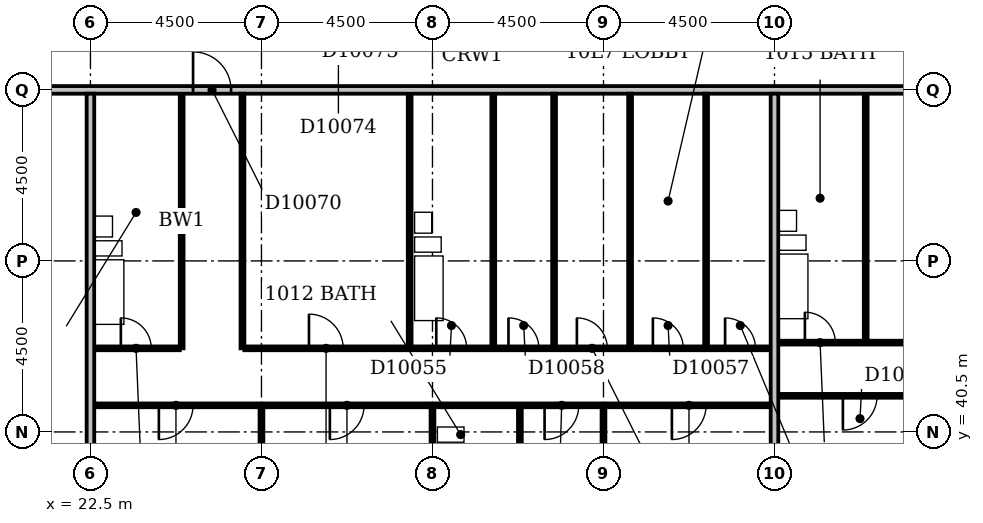
"""IFC4 building model, lengths in metres.
Left out: names, types, materials, properties, quantities, classifications, styles, units other than length and angle.
Written with IfcOpenShell. Run it as: python <this file> out.ifc"""

import sys

from ifc_helpers import new_model, si_unit, direction, frame, frame_2d, origin, place, context, subcontext, project, spatial, rectangle, extrude, element, fill, save


model = new_model("IFC4")
c1 = context("Model", 3, precision=1e-05, world=origin(), true_north=direction((0.0, 1.0)))
c2 = subcontext(c1, "Body", "Model", "MODEL_VIEW")
j1 = project(units=[si_unit("LENGTHUNIT", "METRE"), si_unit("PLANEANGLEUNIT", "RADIAN")], contexts=[c1])
p1 = place(None, origin())
s1 = spatial("IfcSite", under=j1, at=p1, CompositionType="ELEMENT")
p2 = place(p1, origin())
s2 = spatial("IfcBuilding", under=s1, at=p2, CompositionType="ELEMENT")
p3 = place(p2, frame((0.0, 0.0, 47.0)))
s3 = spatial("IfcBuildingStorey", under=s2, at=p3, CompositionType="ELEMENT", Elevation=47.0)
p4 = place(p3, frame((22.5, 36.6, 0.0), z_axis=(0.0, 0.0, 1.0), x_axis=(0.0, 1.0, 0.0)))
e1 = element("IfcWall", 1, at=p4, inside=s3, PredefinedType="PARTITIONING", context=c2, shape_type="SweptSolid", body=[
    extrude(rectangle(XDim=12.8, YDim=0.2, at=frame_2d((6.4, 0.0))), origin(), (0.0, 0.0, 1.0), 3.3),
])
p5 = place(p3, frame((27.0, 36.6, 0.0), z_axis=(0.0, 0.0, 1.0), x_axis=(0.0, 1.0, 0.0)))
e2 = element("IfcWall", 2, at=p5, inside=s3, PredefinedType="PARTITIONING", context=c2, shape_type="SweptSolid", body=[
    extrude(rectangle(XDim=4.55, YDim=0.1, at=frame_2d((2.275, 0.0))), origin(), (0.0, 0.0, 1.0), 2.6),
])
p6 = place(p3, frame((31.5, 36.6, 0.0), z_axis=(0.0, 0.0, 1.0), x_axis=(0.0, 1.0, 0.0)))
e3 = element("IfcWall", 3, at=p6, inside=s3, PredefinedType="PARTITIONING", context=c2, shape_type="SweptSolid", body=[
    extrude(rectangle(XDim=4.55, YDim=0.1, at=frame_2d((2.275, 0.0))), origin(), (0.0, 0.0, 1.0), 3.3),
])
p7 = place(p3, frame((36.0, 36.6, 0.0), z_axis=(0.0, 0.0, 1.0), x_axis=(0.0, 1.0, 0.0)))
e4 = element("IfcWall", 4, at=p7, inside=s3, PredefinedType="PARTITIONING", context=c2, shape_type="SweptSolid", body=[
    extrude(rectangle(XDim=4.55, YDim=0.1, at=frame_2d((2.275, 0.0))), origin(), (0.0, 0.0, 1.0), 2.4),
])
p8 = place(p3, frame((40.5, 36.6, 0.0), z_axis=(0.0, 0.0, 1.0), x_axis=(0.0, 1.0, 0.0)))
e5 = element("IfcWall", 5, at=p8, inside=s3, PredefinedType="PARTITIONING", context=c2, shape_type="SweptSolid", body=[
    extrude(rectangle(XDim=12.8, YDim=0.2, at=frame_2d((6.4, 0.0))), origin(), (0.0, 0.0, 1.0), 3.3),
])
p9 = place(p3, frame((33.8, 38.3, 0.0), z_axis=(0.0, 0.0, 1.0), x_axis=(0.0, 1.0, 0.0)))
e6 = element("IfcWall", 6, at=p9, inside=s3, PredefinedType="PLUMBINGWALL", context=c2, shape_type="SweptSolid", body=[
    extrude(rectangle(XDim=2.85, YDim=0.1, at=frame_2d((1.425, 0.0))), origin(), (0.0, 0.0, 1.0), 3.3),
])
p10 = place(p9, frame((1.05, 0.0, 0.0)))
e7 = element("IfcOpeningElement", 7, at=p10, cuts=e6, PredefinedType="OPENING", context=c2, shape_type="SweptSolid", body=[
    extrude(rectangle(XDim=0.8, YDim=2.1, at=frame_2d((0.4, 1.05))), frame((0.0, 0.062, 0.0), z_axis=(0.0, -1.0, 0.0), x_axis=(1.0, 0.0, 0.0)), (0.0, 0.0, 1.0), 0.124),
])
p11 = place(p3, frame((22.6, 41.2, 0.0), z_axis=(0.0, 0.0, 1.0), x_axis=(1.0, 0.0, 0.0)))
e8 = element("IfcWall", 8, at=p11, inside=s3, PredefinedType="PARTITIONING", context=c2, shape_type="SweptSolid", body=[
    extrude(rectangle(XDim=17.8, YDim=0.1, at=frame_2d((8.9, 0.0))), origin(), (0.0, 0.0, 1.0), 3.3),
])
p12 = place(p11, frame((1.7, 0.0, 0.0)))
e9 = element("IfcOpeningElement", 9, at=p12, cuts=e8, PredefinedType="OPENING", context=c2, shape_type="SweptSolid", body=[
    extrude(rectangle(XDim=0.9, YDim=2.1, at=frame_2d((0.45, 1.05))), frame((0.0, 0.062, 0.0), z_axis=(0.0, -1.0, 0.0), x_axis=(1.0, 0.0, 0.0)), (0.0, 0.0, 1.0), 0.124),
])
p13 = place(p11, frame((6.2, 0.0, 0.0)))
e10 = element("IfcOpeningElement", 10, at=p13, cuts=e8, PredefinedType="OPENING", context=c2, shape_type="SweptSolid", body=[
    extrude(rectangle(XDim=0.9, YDim=2.1, at=frame_2d((0.45, 1.05))), frame((0.0, 0.062, 0.0), z_axis=(0.0, -1.0, 0.0), x_axis=(1.0, 0.0, 0.0)), (0.0, 0.0, 1.0), 0.124),
])
p14 = place(p11, frame((11.85, 0.0, 0.0)))
e11 = element("IfcOpeningElement", 11, at=p14, cuts=e8, PredefinedType="OPENING", context=c2, shape_type="SweptSolid", body=[
    extrude(rectangle(XDim=0.9, YDim=2.1, at=frame_2d((0.45, 1.05))), frame((0.0, 0.062, 0.0), z_axis=(0.0, -1.0, 0.0), x_axis=(1.0, 0.0, 0.0)), (0.0, 0.0, 1.0), 0.124),
])
p15 = place(p11, frame((15.2, 0.0, 0.0)))
e12 = element("IfcOpeningElement", 12, at=p15, cuts=e8, PredefinedType="OPENING", context=c2, shape_type="SweptSolid", body=[
    extrude(rectangle(XDim=0.9, YDim=2.1, at=frame_2d((0.45, 1.05))), frame((0.0, 0.062, 0.0), z_axis=(0.0, -1.0, 0.0), x_axis=(1.0, 0.0, 0.0)), (0.0, 0.0, 1.0), 0.124),
])
p16 = place(p3, frame((40.6, 41.45, 0.0), z_axis=(0.0, 0.0, 1.0), x_axis=(1.0, 0.0, 0.0)))
e13 = element("IfcWall", 13, at=p16, inside=s3, PredefinedType="PARTITIONING", context=c2, shape_type="SweptSolid", body=[
    extrude(rectangle(XDim=13.3, YDim=0.1, at=frame_2d((6.65, 0.0))), origin(), (0.0, 0.0, 1.0), 3.3),
])
p17 = place(p16, frame((1.7, 0.0, 0.0)))
e14 = element("IfcOpeningElement", 14, at=p17, cuts=e13, PredefinedType="OPENING", context=c2, shape_type="SweptSolid", body=[
    extrude(rectangle(XDim=0.9, YDim=2.1, at=frame_2d((0.45, 1.05))), frame((0.0, 0.062, 0.0), z_axis=(0.0, -1.0, 0.0), x_axis=(1.0, 0.0, 0.0)), (0.0, 0.0, 1.0), 0.124),
])
p18 = place(p16, frame((6.2, 0.0, 0.0)))
e15 = element("IfcOpeningElement", 15, at=p18, cuts=e13, PredefinedType="OPENING", context=c2, shape_type="SweptSolid", body=[
    extrude(rectangle(XDim=0.9, YDim=2.1, at=frame_2d((0.45, 1.05))), frame((0.0, 0.062, 0.0), z_axis=(0.0, -1.0, 0.0), x_axis=(1.0, 0.0, 0.0)), (0.0, 0.0, 1.0), 0.124),
])
p19 = place(p16, frame((10.7, 0.0, 0.0)))
e16 = element("IfcOpeningElement", 16, at=p19, cuts=e13, PredefinedType="OPENING", context=c2, shape_type="SweptSolid", body=[
    extrude(rectangle(XDim=0.9, YDim=2.1, at=frame_2d((0.45, 1.05))), frame((0.0, 0.062, 0.0), z_axis=(0.0, -1.0, 0.0), x_axis=(1.0, 0.0, 0.0)), (0.0, 0.0, 1.0), 0.124),
])
p20 = place(p3, frame((22.6, 42.7, 0.0), z_axis=(0.0, 0.0, 1.0), x_axis=(1.0, 0.0, 0.0)))
e17 = element("IfcWall", 17, at=p20, inside=s3, PredefinedType="PARTITIONING", context=c2, shape_type="SweptSolid", body=[
    extrude(rectangle(XDim=2.25, YDim=0.1, at=frame_2d((1.125, 0.0))), origin(), (0.0, 0.0, 1.0), 3.3),
])
p21 = place(p20, frame((0.7, 0.0, 0.0)))
e18 = element("IfcOpeningElement", 18, at=p21, cuts=e17, PredefinedType="OPENING", context=c2, shape_type="SweptSolid", body=[
    extrude(rectangle(XDim=0.8, YDim=2.1, at=frame_2d((0.4, 1.05))), frame((0.0, 0.062, 0.0), z_axis=(0.0, -1.0, 0.0), x_axis=(1.0, 0.0, 0.0)), (0.0, 0.0, 1.0), 0.124),
])
p22 = place(p3, frame((24.9, 42.7, 0.0), z_axis=(0.0, 0.0, 1.0), x_axis=(0.0, 1.0, 0.0)))
e19 = element("IfcWall", 19, at=p22, inside=s3, PredefinedType="PLUMBINGWALL", context=c2, shape_type="SweptSolid", body=[
    extrude(rectangle(XDim=6.7, YDim=0.1, at=frame_2d((3.35, 0.0))), origin(), (0.0, 0.0, 1.0), 3.3),
])
p23 = place(p3, frame((26.5, 42.7, 0.0), z_axis=(0.0, 0.0, 1.0), x_axis=(0.0, 1.0, 0.0)))
e20 = element("IfcWall", 20, at=p23, inside=s3, PredefinedType="PARTITIONING", context=c2, shape_type="SweptSolid", body=[
    extrude(rectangle(XDim=6.7, YDim=0.1, at=frame_2d((3.35, 0.0))), origin(), (0.0, 0.0, 1.0), 2.6),
])
p24 = place(p3, frame((26.55, 42.7, 0.0), z_axis=(0.0, 0.0, 1.0), x_axis=(1.0, 0.0, 0.0)))
e21 = element("IfcWall", 21, at=p24, inside=s3, PredefinedType="PARTITIONING", context=c2, shape_type="SweptSolid", body=[
    extrude(rectangle(XDim=13.85, YDim=0.1, at=frame_2d((6.925, 0.0))), origin(), (0.0, 0.0, 1.0), 3.3),
])
p25 = place(p24, frame((5.05, 0.0, 0.0)))
e22 = element("IfcOpeningElement", 22, at=p25, cuts=e21, PredefinedType="OPENING", context=c2, shape_type="SweptSolid", body=[
    extrude(rectangle(XDim=0.8, YDim=2.1, at=frame_2d((0.4, 1.05))), frame((0.0, 0.062, 0.0), z_axis=(0.0, -1.0, 0.0), x_axis=(1.0, 0.0, 0.0)), (0.0, 0.0, 1.0), 0.124),
])
p26 = place(p24, frame((1.7, 0.0, 0.0)))
e23 = element("IfcOpeningElement", 23, at=p26, cuts=e21, PredefinedType="OPENING", context=c2, shape_type="SweptSolid", body=[
    extrude(rectangle(XDim=0.9, YDim=2.1, at=frame_2d((0.45, 1.05))), frame((0.0, 0.062, 0.0), z_axis=(0.0, -1.0, 0.0), x_axis=(1.0, 0.0, 0.0)), (0.0, 0.0, 1.0), 0.124),
])
p27 = place(p24, frame((10.75, 0.0, 0.0)))
e24 = element("IfcOpeningElement", 24, at=p27, cuts=e21, PredefinedType="OPENING", context=c2, shape_type="SweptSolid", body=[
    extrude(rectangle(XDim=0.8, YDim=2.1, at=frame_2d((0.4, 1.05))), frame((0.0, 0.062, 0.0), z_axis=(0.0, -1.0, 0.0), x_axis=(1.0, 0.0, 0.0)), (0.0, 0.0, 1.0), 0.124),
])
p28 = place(p24, frame((6.95, 0.0, 0.0)))
e25 = element("IfcOpeningElement", 25, at=p28, cuts=e21, PredefinedType="OPENING", context=c2, shape_type="SweptSolid", body=[
    extrude(rectangle(XDim=0.8, YDim=2.1, at=frame_2d((0.4, 1.05))), frame((0.0, 0.062, 0.0), z_axis=(0.0, -1.0, 0.0), x_axis=(1.0, 0.0, 0.0)), (0.0, 0.0, 1.0), 0.124),
])
p29 = place(p24, frame((8.75, 0.0, 0.0)))
e26 = element("IfcOpeningElement", 26, at=p29, cuts=e21, PredefinedType="OPENING", context=c2, shape_type="SweptSolid", body=[
    extrude(rectangle(XDim=0.8, YDim=2.1, at=frame_2d((0.4, 1.05))), frame((0.0, 0.062, 0.0), z_axis=(0.0, -1.0, 0.0), x_axis=(1.0, 0.0, 0.0)), (0.0, 0.0, 1.0), 0.124),
])
p30 = place(p24, frame((12.65, 0.0, 0.0)))
e27 = element("IfcOpeningElement", 27, at=p30, cuts=e21, PredefinedType="OPENING", context=c2, shape_type="SweptSolid", body=[
    extrude(rectangle(XDim=0.8, YDim=2.1, at=frame_2d((0.4, 1.05))), frame((0.0, 0.062, 0.0), z_axis=(0.0, -1.0, 0.0), x_axis=(1.0, 0.0, 0.0)), (0.0, 0.0, 1.0), 0.124),
])
for number, where, z_axis, x_axis in (
    (28, (30.9, 42.75, 0.0), (0.0, 0.0, 1.0), (0.0, 1.0, 0.0)),
    (29, (33.1, 42.75, 0.0), (0.0, 0.0, 1.0), (0.0, 1.0, 0.0)),
):
    element("IfcWall", number, at=place(p3, frame(where, z_axis=z_axis, x_axis=x_axis)), inside=s3, PredefinedType="PLUMBINGWALL", context=c2, shape_type="SweptSolid", body=[
        extrude(rectangle(XDim=6.65, YDim=0.1, at=frame_2d((3.325, 0.0))), origin(), (0.0, 0.0, 1.0), 3.3),
    ])
p31 = place(p3, frame((34.7, 42.75, 0.0), z_axis=(0.0, 0.0, 1.0), x_axis=(0.0, 1.0, 0.0)))
e30 = element("IfcWall", 30, at=p31, inside=s3, PredefinedType="PARTITIONING", context=c2, shape_type="SweptSolid", body=[
    extrude(rectangle(XDim=6.65, YDim=0.1, at=frame_2d((3.325, 0.0))), origin(), (0.0, 0.0, 1.0), 3.3),
])
p32 = place(p3, frame((36.7, 42.75, 0.0), z_axis=(0.0, 0.0, 1.0), x_axis=(0.0, 1.0, 0.0)))
e31 = element("IfcWall", 31, at=p32, inside=s3, PredefinedType="PARTITIONING", context=c2, shape_type="SweptSolid", body=[
    extrude(rectangle(XDim=6.65, YDim=0.1, at=frame_2d((3.325, 0.0))), origin(), (0.0, 0.0, 1.0), 2.4),
])
p33 = place(p3, frame((38.7, 42.75, 0.0), z_axis=(0.0, 0.0, 1.0), x_axis=(0.0, 1.0, 0.0)))
e32 = element("IfcWall", 32, at=p33, inside=s3, PredefinedType="PARTITIONING", context=c2, shape_type="SweptSolid", body=[
    extrude(rectangle(XDim=6.65, YDim=0.1, at=frame_2d((3.325, 0.0))), origin(), (0.0, 0.0, 1.0), 3.3),
])
p34 = place(p3, frame((40.6, 42.85, 0.0), z_axis=(0.0, 0.0, 1.0), x_axis=(1.0, 0.0, 0.0)))
e33 = element("IfcWall", 33, at=p34, inside=s3, PredefinedType="PARTITIONING", context=c2, shape_type="SweptSolid", body=[
    extrude(rectangle(XDim=8.15, YDim=0.1, at=frame_2d((4.075, 0.0))), origin(), (0.0, 0.0, 1.0), 3.3),
])
p35 = place(p34, frame((0.7, 0.0, 0.0)))
e34 = element("IfcOpeningElement", 34, at=p35, cuts=e33, PredefinedType="OPENING", context=c2, shape_type="SweptSolid", body=[
    extrude(rectangle(XDim=0.8, YDim=2.1, at=frame_2d((0.4, 1.05))), frame((0.0, 0.062, 0.0), z_axis=(0.0, -1.0, 0.0), x_axis=(1.0, 0.0, 0.0)), (0.0, 0.0, 1.0), 0.124),
])
p36 = place(p34, frame((4.8, 0.0, 0.0)))
e35 = element("IfcOpeningElement", 35, at=p36, cuts=e33, PredefinedType="OPENING", context=c2, shape_type="SweptSolid", body=[
    extrude(rectangle(XDim=0.9, YDim=2.1, at=frame_2d((0.45, 1.05))), frame((0.0, 0.062, 0.0), z_axis=(0.0, -1.0, 0.0), x_axis=(1.0, 0.0, 0.0)), (0.0, 0.0, 1.0), 0.124),
])
p37 = place(p3, frame((42.9, 42.9, 0.0), z_axis=(0.0, 0.0, 1.0), x_axis=(0.0, 1.0, 0.0)))
e36 = element("IfcWall", 36, at=p37, inside=s3, PredefinedType="PLUMBINGWALL", context=c2, shape_type="SweptSolid", body=[
    extrude(rectangle(XDim=6.5, YDim=0.1, at=frame_2d((3.25, 0.0))), origin(), (0.0, 0.0, 1.0), 3.3),
])
p38 = place(p3, frame((9.1, 49.5, 0.0), z_axis=(0.0, 0.0, 1.0), x_axis=(1.0, 0.0, 0.0)))
e37 = element("IfcWall", 37, at=p38, inside=s3, PredefinedType="PARTITIONING", context=c2, shape_type="SweptSolid", body=[
    extrude(rectangle(XDim=57.8, YDim=0.2, at=frame_2d((28.9, 0.0))), origin(), (0.0, 0.0, 1.0), 3.3),
])
p39 = place(p38, frame((16.1, 0.0, 0.0)))
e38 = element("IfcOpeningElement", 38, at=p39, cuts=e37, PredefinedType="OPENING", context=c2, shape_type="SweptSolid", body=[
    extrude(rectangle(XDim=1.0, YDim=2.1, at=frame_2d((0.5, 1.05))), frame((0.0, 0.112, 0.0), z_axis=(0.0, -1.0, 0.0), x_axis=(1.0, 0.0, 0.0)), (0.0, 0.0, 1.0), 0.224),
])
p40 = place(p38, frame((40.0, 0.0, 0.0)))
e39 = element("IfcOpeningElement", 39, at=p40, cuts=e37, PredefinedType="OPENING", context=c2, shape_type="SweptSolid", body=[
    extrude(rectangle(XDim=1.0, YDim=2.1, at=frame_2d((0.5, 1.05))), frame((0.0, 0.112, 0.0), z_axis=(0.0, -1.0, 0.0), x_axis=(1.0, 0.0, 0.0)), (0.0, 0.0, 1.0), 0.224),
])
p41 = place(p38, frame((45.2, 0.0, 0.0)))
e40 = element("IfcOpeningElement", 40, at=p41, cuts=e37, PredefinedType="OPENING", context=c2, shape_type="SweptSolid", body=[
    extrude(rectangle(XDim=1.0, YDim=2.1, at=frame_2d((0.5, 1.05))), frame((0.0, 0.112, 0.0), z_axis=(0.0, -1.0, 0.0), x_axis=(1.0, 0.0, 0.0)), (0.0, 0.0, 1.0), 0.224),
])
p42 = place(p38, frame((3.9, 0.0, 0.0)))
e41 = element("IfcOpeningElement", 41, at=p42, cuts=e37, PredefinedType="OPENING", context=c2, shape_type="SweptSolid", body=[
    extrude(rectangle(XDim=0.9, YDim=2.1, at=frame_2d((0.45, 1.05))), frame((0.0, 0.112, 0.0), z_axis=(0.0, -1.0, 0.0), x_axis=(1.0, 0.0, 0.0)), (0.0, 0.0, 1.0), 0.224),
])
p43 = place(p12, frame((0.9, 0.0, 0.0), z_axis=(0.0, 0.0, 1.0), x_axis=(-1.0, 0.0, 0.0)))
e42 = element("IfcDoor", 42, at=p43, inside=s3, OperationType="SINGLE_SWING_RIGHT", PredefinedType="DOOR", context=c2, shape_type="SweptSolid", body=[
    extrude(rectangle(XDim=0.9, YDim=2.1, at=frame_2d((0.45, 1.05))), frame((0.0, 0.025, 0.0), z_axis=(0.0, -1.0, 0.0), x_axis=(1.0, 0.0, 0.0)), (0.0, 0.0, 1.0), 0.05),
])
fill(e9, e42)
p44 = place(p13, frame((0.9, 0.0, 0.0), z_axis=(0.0, 0.0, 1.0), x_axis=(-1.0, 0.0, 0.0)))
e43 = element("IfcDoor", 43, at=p44, inside=s3, OperationType="SINGLE_SWING_RIGHT", PredefinedType="DOOR", context=c2, shape_type="SweptSolid", body=[
    extrude(rectangle(XDim=0.9, YDim=2.1, at=frame_2d((0.45, 1.05))), frame((0.0, 0.025, 0.0), z_axis=(0.0, -1.0, 0.0), x_axis=(1.0, 0.0, 0.0)), (0.0, 0.0, 1.0), 0.05),
])
fill(e10, e43)
p45 = place(p14, frame((0.9, 0.0, 0.0), z_axis=(0.0, 0.0, 1.0), x_axis=(-1.0, 0.0, 0.0)))
e44 = element("IfcDoor", 44, at=p45, inside=s3, OperationType="SINGLE_SWING_RIGHT", PredefinedType="DOOR", context=c2, shape_type="SweptSolid", body=[
    extrude(rectangle(XDim=0.9, YDim=2.1, at=frame_2d((0.45, 1.05))), frame((0.0, 0.025, 0.0), z_axis=(0.0, -1.0, 0.0), x_axis=(1.0, 0.0, 0.0)), (0.0, 0.0, 1.0), 0.05),
])
fill(e11, e44)
p46 = place(p15, frame((0.9, 0.0, 0.0), z_axis=(0.0, 0.0, 1.0), x_axis=(-1.0, 0.0, 0.0)))
e45 = element("IfcDoor", 45, at=p46, inside=s3, OperationType="SINGLE_SWING_RIGHT", PredefinedType="DOOR", context=c2, shape_type="SweptSolid", body=[
    extrude(rectangle(XDim=0.9, YDim=2.1, at=frame_2d((0.45, 1.05))), frame((0.0, 0.025, 0.0), z_axis=(0.0, -1.0, 0.0), x_axis=(1.0, 0.0, 0.0)), (0.0, 0.0, 1.0), 0.05),
])
fill(e12, e45)
p47 = place(p17, frame((0.9, 0.0, 0.0), z_axis=(0.0, 0.0, 1.0), x_axis=(-1.0, 0.0, 0.0)))
e46 = element("IfcDoor", 46, at=p47, inside=s3, OperationType="SINGLE_SWING_RIGHT", PredefinedType="DOOR", context=c2, shape_type="SweptSolid", body=[
    extrude(rectangle(XDim=0.9, YDim=2.1, at=frame_2d((0.45, 1.05))), frame((0.0, 0.025, 0.0), z_axis=(0.0, -1.0, 0.0), x_axis=(1.0, 0.0, 0.0)), (0.0, 0.0, 1.0), 0.05),
])
fill(e14, e46)
p48 = place(p21, origin())
e47 = element("IfcDoor", 47, at=p48, inside=s3, OperationType="SINGLE_SWING_LEFT", PredefinedType="DOOR", context=c2, shape_type="SweptSolid", body=[
    extrude(rectangle(XDim=0.8, YDim=2.1, at=frame_2d((0.4, 1.05))), frame((0.0, 0.025, 0.0), z_axis=(0.0, -1.0, 0.0), x_axis=(1.0, 0.0, 0.0)), (0.0, 0.0, 1.0), 0.05),
])
fill(e18, e47)
p49 = place(p25, origin())
e48 = element("IfcDoor", 48, at=p49, inside=s3, OperationType="SINGLE_SWING_LEFT", PredefinedType="DOOR", context=c2, shape_type="SweptSolid", body=[
    extrude(rectangle(XDim=0.8, YDim=2.1, at=frame_2d((0.4, 1.05))), frame((0.0, 0.025, 0.0), z_axis=(0.0, -1.0, 0.0), x_axis=(1.0, 0.0, 0.0)), (0.0, 0.0, 1.0), 0.05),
])
fill(e22, e48)
p50 = place(p26, origin())
e49 = element("IfcDoor", 49, at=p50, inside=s3, OperationType="SINGLE_SWING_LEFT", PredefinedType="DOOR", context=c2, shape_type="SweptSolid", body=[
    extrude(rectangle(XDim=0.9, YDim=2.1, at=frame_2d((0.45, 1.05))), frame((0.0, 0.025, 0.0), z_axis=(0.0, -1.0, 0.0), x_axis=(1.0, 0.0, 0.0)), (0.0, 0.0, 1.0), 0.05),
])
fill(e23, e49)
p51 = place(p27, origin())
e50 = element("IfcDoor", 50, at=p51, inside=s3, OperationType="SINGLE_SWING_LEFT", PredefinedType="DOOR", context=c2, shape_type="SweptSolid", body=[
    extrude(rectangle(XDim=0.8, YDim=2.1, at=frame_2d((0.4, 1.05))), frame((0.0, 0.025, 0.0), z_axis=(0.0, -1.0, 0.0), x_axis=(1.0, 0.0, 0.0)), (0.0, 0.0, 1.0), 0.05),
])
fill(e24, e50)
p52 = place(p28, origin())
e51 = element("IfcDoor", 51, at=p52, inside=s3, OperationType="SINGLE_SWING_LEFT", PredefinedType="DOOR", context=c2, shape_type="SweptSolid", body=[
    extrude(rectangle(XDim=0.8, YDim=2.1, at=frame_2d((0.4, 1.05))), frame((0.0, 0.025, 0.0), z_axis=(0.0, -1.0, 0.0), x_axis=(1.0, 0.0, 0.0)), (0.0, 0.0, 1.0), 0.05),
])
fill(e25, e51)
p53 = place(p29, origin())
e52 = element("IfcDoor", 52, at=p53, inside=s3, OperationType="SINGLE_SWING_LEFT", PredefinedType="DOOR", context=c2, shape_type="SweptSolid", body=[
    extrude(rectangle(XDim=0.8, YDim=2.1, at=frame_2d((0.4, 1.05))), frame((0.0, 0.025, 0.0), z_axis=(0.0, -1.0, 0.0), x_axis=(1.0, 0.0, 0.0)), (0.0, 0.0, 1.0), 0.05),
])
fill(e26, e52)
p54 = place(p30, origin())
e53 = element("IfcDoor", 53, at=p54, inside=s3, OperationType="SINGLE_SWING_LEFT", PredefinedType="DOOR", context=c2, shape_type="SweptSolid", body=[
    extrude(rectangle(XDim=0.8, YDim=2.1, at=frame_2d((0.4, 1.05))), frame((0.0, 0.025, 0.0), z_axis=(0.0, -1.0, 0.0), x_axis=(1.0, 0.0, 0.0)), (0.0, 0.0, 1.0), 0.05),
])
fill(e27, e53)
p55 = place(p35, origin())
e54 = element("IfcDoor", 54, at=p55, inside=s3, OperationType="SINGLE_SWING_LEFT", PredefinedType="DOOR", context=c2, shape_type="SweptSolid", body=[
    extrude(rectangle(XDim=0.8, YDim=2.1, at=frame_2d((0.4, 1.05))), frame((0.0, 0.025, 0.0), z_axis=(0.0, -1.0, 0.0), x_axis=(1.0, 0.0, 0.0)), (0.0, 0.0, 1.0), 0.05),
])
fill(e34, e54)
p56 = place(p39, origin())
e55 = element("IfcDoor", 55, at=p56, inside=s3, OperationType="SINGLE_SWING_LEFT", PredefinedType="DOOR", context=c2, shape_type="SweptSolid", body=[
    extrude(rectangle(XDim=1.0, YDim=2.1, at=frame_2d((0.5, 1.05))), frame((0.0, 0.025, 0.0), z_axis=(0.0, -1.0, 0.0), x_axis=(1.0, 0.0, 0.0)), (0.0, 0.0, 1.0), 0.05),
])
fill(e38, e55)
save(model, sys.argv[1])
